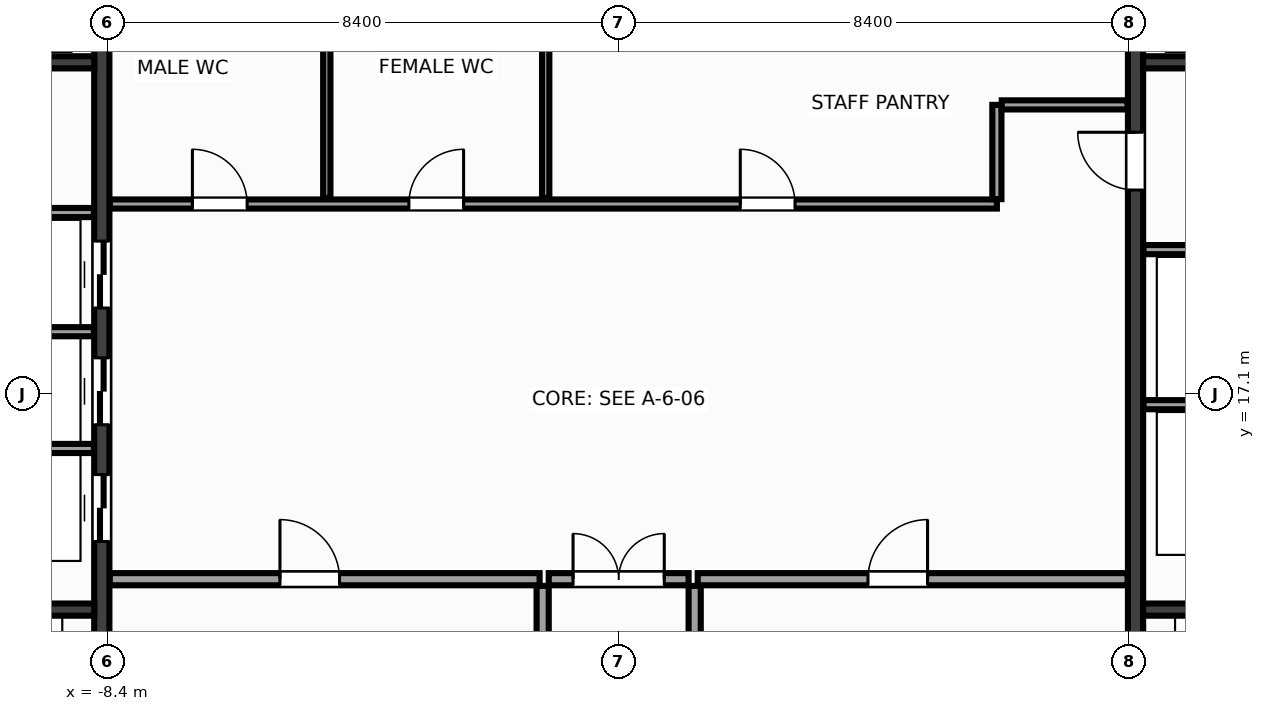
"""IFC4 building model, lengths in metres.
Left out: names, types, materials, properties, quantities, classifications, styles, units other than length and angle.
Written with IfcOpenShell. Run it as: python <this file> out.ifc"""

import sys

from ifc_helpers import new_model, si_unit, direction, frame, frame_2d, origin, place, context, subcontext, project, spatial, rectangle, extrude, source, transform, mapped, element, fill, save


model = new_model("IFC4")
c1 = context("Model", 3, precision=1e-05, world=origin(), true_north=direction((0.0, 1.0)))
c2 = subcontext(c1, "Body", "Model", "MODEL_VIEW")
j1 = project(units=[si_unit("LENGTHUNIT", "METRE"), si_unit("PLANEANGLEUNIT", "RADIAN")], contexts=[c1])
p1 = place(None, origin())
s1 = spatial("IfcSite", under=j1, at=p1, CompositionType="ELEMENT")
p2 = place(p1, origin())
s2 = spatial("IfcBuilding", under=s1, at=p2, CompositionType="ELEMENT")
p3 = place(p2, frame((0.0, 0.0, 268.4)))
s3 = spatial("IfcBuildingStorey", under=s2, at=p3, CompositionType="ELEMENT", Elevation=268.4)
m1 = source(origin(), c2, "Body", "SweptSolid", [
    extrude(rectangle(XDim=13.1, YDim=0.25, at=frame_2d((6.55, 0.0))), origin(), (0.0, 0.0, 1.0), 3.6),
])
p4 = place(p3, frame((-8.5, 10.45, 0.0), z_axis=(0.0, 0.0, 1.0), x_axis=(0.0, 1.0, 0.0)))
e1 = element("IfcWall", 1, at=p4, inside=s3, PredefinedType="SHEAR", context=c2, shape_type="MappedRepresentation", body=[
    mapped(m1, transform((0.0, 0.0, 0.0), x_axis=(1.0, 0.0, 0.0), y_axis=(0.0, 1.0, 0.0), z_axis=(0.0, 0.0, 1.0), scale=1.0)),
])
p5 = place(p4, frame((4.22, 0.0, 0.0)))
e2 = element("IfcOpeningElement", 2, at=p5, cuts=e1, PredefinedType="OPENING", context=c2, shape_type="SweptSolid", body=[
    extrude(rectangle(XDim=1.1, YDim=2.15, at=frame_2d((0.55, 1.075))), frame((0.0, 0.137, 0.0), z_axis=(0.0, -1.0, 0.0), x_axis=(1.0, 0.0, 0.0)), (0.0, 0.0, 1.0), 0.274),
])
p6 = place(p4, frame((6.14, 0.0, 0.0)))
e3 = element("IfcOpeningElement", 3, at=p6, cuts=e1, PredefinedType="OPENING", context=c2, shape_type="SweptSolid", body=[
    extrude(rectangle(XDim=1.1, YDim=2.15, at=frame_2d((0.55, 1.075))), frame((0.0, 0.137, 0.0), z_axis=(0.0, -1.0, 0.0), x_axis=(1.0, 0.0, 0.0)), (0.0, 0.0, 1.0), 0.274),
])
p7 = place(p4, frame((8.06, 0.0, 0.0)))
e4 = element("IfcOpeningElement", 4, at=p7, cuts=e1, PredefinedType="OPENING", context=c2, shape_type="SweptSolid", body=[
    extrude(rectangle(XDim=1.1, YDim=2.15, at=frame_2d((0.55, 1.075))), frame((0.0, 0.137, 0.0), z_axis=(0.0, -1.0, 0.0), x_axis=(1.0, 0.0, 0.0)), (0.0, 0.0, 1.0), 0.274),
])
p8 = place(p3, frame((8.5, 10.45, 0.0), z_axis=(0.0, 0.0, 1.0), x_axis=(0.0, 1.0, 0.0)))
e5 = element("IfcWall", 5, at=p8, inside=s3, PredefinedType="SHEAR", context=c2, shape_type="MappedRepresentation", body=[
    mapped(m1, transform((0.0, 0.0, 0.0), x_axis=(1.0, 0.0, 0.0), y_axis=(0.0, 1.0, 0.0), z_axis=(0.0, 0.0, 1.0), scale=1.0)),
])
p9 = place(p8, frame((10.0, 0.0, 0.0)))
e6 = element("IfcOpeningElement", 6, at=p9, cuts=e5, PredefinedType="OPENING", context=c2, shape_type="SweptSolid", body=[
    extrude(rectangle(XDim=0.95, YDim=2.15, at=frame_2d((0.475, 1.075))), frame((0.0, 0.137, 0.0), z_axis=(0.0, -1.0, 0.0), x_axis=(1.0, 0.0, 0.0)), (0.0, 0.0, 1.0), 0.274),
])
m2 = source(origin(), c2, "Body", "SweptSolid", [
    extrude(rectangle(XDim=2.825, YDim=0.2, at=frame_2d((1.413, 0.0))), origin(), (0.0, 0.0, 1.0), 3.6),
])
for number, where, z_axis, x_axis in (
    (7, (-11.45, 13.55, 0.0), (0.0, 0.0, 1.0), (1.0, 0.0, 0.0)),
    (8, (8.625, 13.55, 0.0), (0.0, 0.0, 1.0), (1.0, 0.0, 0.0)),
):
    element("IfcWall", number, at=place(p3, frame(where, z_axis=z_axis, x_axis=x_axis)), inside=s3, PredefinedType="SHEAR", context=c2, shape_type="MappedRepresentation", body=[
        mapped(m2, transform((0.0, 0.0, 0.0), x_axis=(1.0, 0.0, 0.0), y_axis=(0.0, 1.0, 0.0), z_axis=(0.0, 0.0, 1.0), scale=1.0)),
    ])
m3 = source(origin(), c2, "Body", "SweptSolid", [
    extrude(rectangle(XDim=3.02, YDim=0.2, at=frame_2d((1.51, 0.0))), origin(), (0.0, 0.0, 1.0), 3.6),
])
for number, where, z_axis, x_axis in (
    (9, (-11.645, 22.55, 0.0), (0.0, 0.0, 1.0), (1.0, 0.0, 0.0)),
    (10, (8.625, 22.55, 0.0), (0.0, 0.0, 1.0), (1.0, 0.0, 0.0)),
):
    element("IfcWall", number, at=place(p3, frame(where, z_axis=z_axis, x_axis=x_axis)), inside=s3, PredefinedType="SHEAR", context=c2, shape_type="MappedRepresentation", body=[
        mapped(m3, transform((0.0, 0.0, 0.0), x_axis=(1.0, 0.0, 0.0), y_axis=(0.0, 1.0, 0.0), z_axis=(0.0, 0.0, 1.0), scale=1.0)),
    ])
m4 = source(origin(), c2, "Body", "SweptSolid", [
    extrude(rectangle(XDim=3.01, YDim=0.15, at=frame_2d((1.505, 0.0))), origin(), (0.0, 0.0, 1.0), 3.37),
])
for number, where, z_axis, x_axis in (
    (11, (-11.64, 16.2, 0.0), (0.0, 0.0, 1.0), (1.0, 0.0, 0.0)),
    (12, (-11.64, 18.12, 0.0), (0.0, 0.0, 1.0), (1.0, 0.0, 0.0)),
    (13, (-11.64, 20.08, 0.0), (0.0, 0.0, 1.0), (1.0, 0.0, 0.0)),
    (14, (8.63, 16.92, 0.0), (0.0, 0.0, 1.0), (1.0, 0.0, 0.0)),
    (15, (8.63, 19.47, 0.0), (0.0, 0.0, 1.0), (1.0, 0.0, 0.0)),
):
    element("IfcWall", number, at=place(p3, frame(where, z_axis=z_axis, x_axis=x_axis)), inside=s3, PredefinedType="PARTITIONING", context=c2, shape_type="MappedRepresentation", body=[
        mapped(m4, transform((0.0, 0.0, 0.0), x_axis=(1.0, 0.0, 0.0), y_axis=(0.0, 1.0, 0.0), z_axis=(0.0, 0.0, 1.0), scale=1.0)),
    ])
m5 = source(origin(), c2, "Body", "SweptSolid", [
    extrude(rectangle(XDim=7.07, YDim=0.2, at=frame_2d((3.535, 0.0))), origin(), (0.0, 0.0, 1.0), 3.37),
])
p10 = place(p3, frame((-8.37, 14.05, 0.0), z_axis=(0.0, 0.0, 1.0), x_axis=(1.0, 0.0, 0.0)))
e16 = element("IfcWall", 16, at=p10, inside=s3, PredefinedType="PARTITIONING", context=c2, shape_type="MappedRepresentation", body=[
    mapped(m5, transform((0.0, 0.0, 0.0), x_axis=(1.0, 0.0, 0.0), y_axis=(0.0, 1.0, 0.0), z_axis=(0.0, 0.0, 1.0), scale=1.0)),
])
p11 = place(p10, frame((2.8, 0.0, 0.0)))
e17 = element("IfcOpeningElement", 17, at=p11, cuts=e16, PredefinedType="OPENING", context=c2, shape_type="SweptSolid", body=[
    extrude(rectangle(XDim=0.98, YDim=2.15, at=frame_2d((0.49, 1.075))), frame((0.0, 0.112, 0.0), z_axis=(0.0, -1.0, 0.0), x_axis=(1.0, 0.0, 0.0)), (0.0, 0.0, 1.0), 0.224),
])
p12 = place(p3, frame((1.3, 14.05, 0.0), z_axis=(0.0, 0.0, 1.0), x_axis=(1.0, 0.0, 0.0)))
e18 = element("IfcWall", 18, at=p12, inside=s3, PredefinedType="PARTITIONING", context=c2, shape_type="MappedRepresentation", body=[
    mapped(m5, transform((0.0, 0.0, 0.0), x_axis=(1.0, 0.0, 0.0), y_axis=(0.0, 1.0, 0.0), z_axis=(0.0, 0.0, 1.0), scale=1.0)),
])
p13 = place(p12, frame((2.8, 0.0, 0.0)))
e19 = element("IfcOpeningElement", 19, at=p13, cuts=e18, PredefinedType="OPENING", context=c2, shape_type="SweptSolid", body=[
    extrude(rectangle(XDim=0.98, YDim=2.15, at=frame_2d((0.49, 1.075))), frame((0.0, 0.112, 0.0), z_axis=(0.0, -1.0, 0.0), x_axis=(1.0, 0.0, 0.0)), (0.0, 0.0, 1.0), 0.224),
])
m6 = source(origin(), c2, "Body", "SweptSolid", [
    extrude(rectangle(XDim=3.49, YDim=0.2, at=frame_2d((1.745, 0.0))), origin(), (0.0, 0.0, 1.0), 3.37),
])
for number, where, z_axis, x_axis in (
    (20, (-1.25, 10.45, 0.0), (0.0, 0.0, 1.0), (0.0, 1.0, 0.0)),
    (21, (1.25, 10.45, 0.0), (0.0, 0.0, 1.0), (0.0, 1.0, 0.0)),
):
    element("IfcWall", number, at=place(p3, frame(where, z_axis=z_axis, x_axis=x_axis)), inside=s3, PredefinedType="PARTITIONING", context=c2, shape_type="MappedRepresentation", body=[
        mapped(m6, transform((0.0, 0.0, 0.0), x_axis=(1.0, 0.0, 0.0), y_axis=(0.0, 1.0, 0.0), z_axis=(0.0, 0.0, 1.0), scale=1.0)),
    ])
m7 = source(origin(), c2, "Body", "SweptSolid", [
    extrude(rectangle(XDim=2.3, YDim=0.2, at=frame_2d((1.15, 0.0))), origin(), (0.0, 0.0, 1.0), 3.37),
])
p14 = place(p3, frame((-1.15, 14.05, 0.0), z_axis=(0.0, 0.0, 1.0), x_axis=(1.0, 0.0, 0.0)))
e22 = element("IfcWall", 22, at=p14, inside=s3, PredefinedType="PARTITIONING", context=c2, shape_type="MappedRepresentation", body=[
    mapped(m7, transform((0.0, 0.0, 0.0), x_axis=(1.0, 0.0, 0.0), y_axis=(0.0, 1.0, 0.0), z_axis=(0.0, 0.0, 1.0), scale=1.0)),
])
p15 = place(p14, frame((0.4, 0.0, 0.0)))
e23 = element("IfcOpeningElement", 23, at=p15, cuts=e22, PredefinedType="OPENING", context=c2, shape_type="SweptSolid", body=[
    extrude(rectangle(XDim=1.5, YDim=2.2, at=frame_2d((0.75, 1.1))), frame((0.0, 0.112, 0.0), z_axis=(0.0, -1.0, 0.0), x_axis=(1.0, 0.0, 0.0)), (0.0, 0.0, 1.0), 0.224),
])
m8 = source(origin(), c2, "Body", "SweptSolid", [
    extrude(rectangle(XDim=14.59, YDim=0.15, at=frame_2d((7.295, 0.0))), origin(), (0.0, 0.0, 1.0), 3.37),
])
p16 = place(p3, frame((-8.37, 20.22, 0.0), z_axis=(0.0, 0.0, 1.0), x_axis=(1.0, 0.0, 0.0)))
e24 = element("IfcWall", 24, at=p16, inside=s3, PredefinedType="PARTITIONING", context=c2, shape_type="MappedRepresentation", body=[
    mapped(m8, transform((0.0, 0.0, 0.0), x_axis=(1.0, 0.0, 0.0), y_axis=(0.0, 1.0, 0.0), z_axis=(0.0, 0.0, 1.0), scale=1.0)),
])
p17 = place(p16, frame((1.36, 0.0, 0.0)))
e25 = element("IfcOpeningElement", 25, at=p17, cuts=e24, PredefinedType="OPENING", context=c2, shape_type="SweptSolid", body=[
    extrude(rectangle(XDim=0.9, YDim=2.15, at=frame_2d((0.45, 1.075))), frame((0.0, 0.087, 0.0), z_axis=(0.0, -1.0, 0.0), x_axis=(1.0, 0.0, 0.0)), (0.0, 0.0, 1.0), 0.174),
])
p18 = place(p16, frame((4.92, 0.0, 0.0)))
e26 = element("IfcOpeningElement", 26, at=p18, cuts=e24, PredefinedType="OPENING", context=c2, shape_type="SweptSolid", body=[
    extrude(rectangle(XDim=0.9, YDim=2.15, at=frame_2d((0.45, 1.075))), frame((0.0, 0.087, 0.0), z_axis=(0.0, -1.0, 0.0), x_axis=(1.0, 0.0, 0.0)), (0.0, 0.0, 1.0), 0.174),
])
p19 = place(p16, frame((10.37, 0.0, 0.0)))
e27 = element("IfcOpeningElement", 27, at=p19, cuts=e24, PredefinedType="OPENING", context=c2, shape_type="SweptSolid", body=[
    extrude(rectangle(XDim=0.9, YDim=2.15, at=frame_2d((0.45, 1.075))), frame((0.0, 0.087, 0.0), z_axis=(0.0, -1.0, 0.0), x_axis=(1.0, 0.0, 0.0)), (0.0, 0.0, 1.0), 0.174),
])
m9 = source(origin(), c2, "Body", "SweptSolid", [
    extrude(rectangle(XDim=1.55, YDim=0.15, at=frame_2d((0.775, 0.0))), origin(), (0.0, 0.0, 1.0), 3.37),
])
p20 = place(p3, frame((6.22, 20.3, 0.0), z_axis=(0.0, 0.0, 1.0), x_axis=(0.0, 1.0, 0.0)))
e28 = element("IfcWall", 28, at=p20, inside=s3, PredefinedType="PARTITIONING", context=c2, shape_type="MappedRepresentation", body=[
    mapped(m9, transform((0.0, 0.0, 0.0), x_axis=(1.0, 0.0, 0.0), y_axis=(0.0, 1.0, 0.0), z_axis=(0.0, 0.0, 1.0), scale=1.0)),
])
m10 = source(origin(), c2, "Body", "SweptSolid", [
    extrude(rectangle(XDim=2.07, YDim=0.15, at=frame_2d((1.035, 0.0))), origin(), (0.0, 0.0, 1.0), 3.37),
])
p21 = place(p3, frame((6.3, 21.85, 0.0), z_axis=(0.0, 0.0, 1.0), x_axis=(1.0, 0.0, 0.0)))
e29 = element("IfcWall", 29, at=p21, inside=s3, PredefinedType="PARTITIONING", context=c2, shape_type="MappedRepresentation", body=[
    mapped(m10, transform((0.0, 0.0, 0.0), x_axis=(1.0, 0.0, 0.0), y_axis=(0.0, 1.0, 0.0), z_axis=(0.0, 0.0, 1.0), scale=1.0)),
])
m11 = source(origin(), c2, "Body", "SweptSolid", [
    extrude(rectangle(XDim=3.19, YDim=0.12, at=frame_2d((1.595, 0.0))), origin(), (0.0, 0.0, 1.0), 3.37),
])
for number, where, z_axis, x_axis in (
    (30, (-4.8, 20.32, 0.0), (0.0, 0.0, 1.0), (0.0, 1.0, 0.0)),
    (31, (-1.2, 20.32, 0.0), (0.0, 0.0, 1.0), (0.0, 1.0, 0.0)),
):
    element("IfcWall", number, at=place(p3, frame(where, z_axis=z_axis, x_axis=x_axis)), inside=s3, PredefinedType="PARTITIONING", context=c2, shape_type="MappedRepresentation", body=[
        mapped(m11, transform((0.0, 0.0, 0.0), x_axis=(1.0, 0.0, 0.0), y_axis=(0.0, 1.0, 0.0), z_axis=(0.0, 0.0, 1.0), scale=1.0)),
    ])
m12 = source(origin(), c2, "Body", "SweptSolid", [
    extrude(rectangle(XDim=1.1, YDim=2.15, at=frame_2d((0.55, 1.075))), frame((0.0, 0.025, 0.0), z_axis=(0.0, -1.0, 0.0), x_axis=(1.0, 0.0, 0.0)), (0.0, 0.0, 1.0), 0.05),
])
p22 = place(p5, origin())
e32 = element("IfcDoor", 32, at=p22, inside=s3, OperationType="DOUBLE_DOOR_SLIDING", PredefinedType="DOOR", context=c2, shape_type="MappedRepresentation", body=[
    mapped(m12, transform((0.0, 0.0, 0.0), x_axis=(1.0, 0.0, 0.0), y_axis=(0.0, 1.0, 0.0), z_axis=(0.0, 0.0, 1.0), scale=1.0)),
])
fill(e2, e32)
p23 = place(p6, origin())
e33 = element("IfcDoor", 33, at=p23, inside=s3, OperationType="DOUBLE_DOOR_SLIDING", PredefinedType="DOOR", context=c2, shape_type="MappedRepresentation", body=[
    mapped(m12, transform((0.0, 0.0, 0.0), x_axis=(1.0, 0.0, 0.0), y_axis=(0.0, 1.0, 0.0), z_axis=(0.0, 0.0, 1.0), scale=1.0)),
])
fill(e3, e33)
p24 = place(p7, origin())
e34 = element("IfcDoor", 34, at=p24, inside=s3, OperationType="DOUBLE_DOOR_SLIDING", PredefinedType="DOOR", context=c2, shape_type="MappedRepresentation", body=[
    mapped(m12, transform((0.0, 0.0, 0.0), x_axis=(1.0, 0.0, 0.0), y_axis=(0.0, 1.0, 0.0), z_axis=(0.0, 0.0, 1.0), scale=1.0)),
])
fill(e4, e34)
m13 = source(origin(), c2, "Body", "SweptSolid", [
    extrude(rectangle(XDim=0.95, YDim=2.15, at=frame_2d((0.475, 1.075))), frame((0.0, 0.025, 0.0), z_axis=(0.0, -1.0, 0.0), x_axis=(1.0, 0.0, 0.0)), (0.0, 0.0, 1.0), 0.05),
])
p25 = place(p9, origin())
e35 = element("IfcDoor", 35, at=p25, inside=s3, OperationType="SINGLE_SWING_RIGHT", PredefinedType="DOOR", context=c2, shape_type="MappedRepresentation", body=[
    mapped(m13, transform((0.0, 0.0, 0.0), x_axis=(1.0, 0.0, 0.0), y_axis=(0.0, 1.0, 0.0), z_axis=(0.0, 0.0, 1.0), scale=1.0)),
])
fill(e6, e35)
m14 = source(origin(), c2, "Body", "SweptSolid", [
    extrude(rectangle(XDim=0.98, YDim=2.15, at=frame_2d((0.49, 1.075))), frame((0.0, 0.025, 0.0), z_axis=(0.0, -1.0, 0.0), x_axis=(1.0, 0.0, 0.0)), (0.0, 0.0, 1.0), 0.05),
])
p26 = place(p11, origin())
e36 = element("IfcDoor", 36, at=p26, inside=s3, OperationType="SINGLE_SWING_LEFT", PredefinedType="DOOR", context=c2, shape_type="MappedRepresentation", body=[
    mapped(m14, transform((0.0, 0.0, 0.0), x_axis=(1.0, 0.0, 0.0), y_axis=(0.0, 1.0, 0.0), z_axis=(0.0, 0.0, 1.0), scale=1.0)),
])
fill(e17, e36)
p27 = place(p13, origin())
e37 = element("IfcDoor", 37, at=p27, inside=s3, OperationType="SINGLE_SWING_RIGHT", PredefinedType="DOOR", context=c2, shape_type="MappedRepresentation", body=[
    mapped(m14, transform((0.0, 0.0, 0.0), x_axis=(1.0, 0.0, 0.0), y_axis=(0.0, 1.0, 0.0), z_axis=(0.0, 0.0, 1.0), scale=1.0)),
])
fill(e19, e37)
m15 = source(origin(), c2, "Body", "SweptSolid", [
    extrude(rectangle(XDim=1.5, YDim=2.2, at=frame_2d((0.75, 1.1))), frame((0.0, 0.025, 0.0), z_axis=(0.0, -1.0, 0.0), x_axis=(1.0, 0.0, 0.0)), (0.0, 0.0, 1.0), 0.05),
])
p28 = place(p15, origin())
e38 = element("IfcDoor", 38, at=p28, inside=s3, OperationType="DOUBLE_DOOR_SINGLE_SWING", PredefinedType="DOOR", context=c2, shape_type="MappedRepresentation", body=[
    mapped(m15, transform((0.0, 0.0, 0.0), x_axis=(1.0, 0.0, 0.0), y_axis=(0.0, 1.0, 0.0), z_axis=(0.0, 0.0, 1.0), scale=1.0)),
])
fill(e23, e38)
m16 = source(origin(), c2, "Body", "SweptSolid", [
    extrude(rectangle(XDim=0.9, YDim=2.15, at=frame_2d((0.45, 1.075))), frame((0.0, 0.025, 0.0), z_axis=(0.0, -1.0, 0.0), x_axis=(1.0, 0.0, 0.0)), (0.0, 0.0, 1.0), 0.05),
])
p29 = place(p17, origin())
e39 = element("IfcDoor", 39, at=p29, inside=s3, OperationType="SINGLE_SWING_LEFT", PredefinedType="DOOR", context=c2, shape_type="MappedRepresentation", body=[
    mapped(m16, transform((0.0, 0.0, 0.0), x_axis=(1.0, 0.0, 0.0), y_axis=(0.0, 1.0, 0.0), z_axis=(0.0, 0.0, 1.0), scale=1.0)),
])
fill(e25, e39)
p30 = place(p18, origin())
e40 = element("IfcDoor", 40, at=p30, inside=s3, OperationType="SINGLE_SWING_RIGHT", PredefinedType="DOOR", context=c2, shape_type="MappedRepresentation", body=[
    mapped(m16, transform((0.0, 0.0, 0.0), x_axis=(1.0, 0.0, 0.0), y_axis=(0.0, 1.0, 0.0), z_axis=(0.0, 0.0, 1.0), scale=1.0)),
])
fill(e26, e40)
p31 = place(p19, origin())
e41 = element("IfcDoor", 41, at=p31, inside=s3, OperationType="SINGLE_SWING_LEFT", PredefinedType="DOOR", context=c2, shape_type="MappedRepresentation", body=[
    mapped(m16, transform((0.0, 0.0, 0.0), x_axis=(1.0, 0.0, 0.0), y_axis=(0.0, 1.0, 0.0), z_axis=(0.0, 0.0, 1.0), scale=1.0)),
])
fill(e27, e41)
save(model, sys.argv[1])
